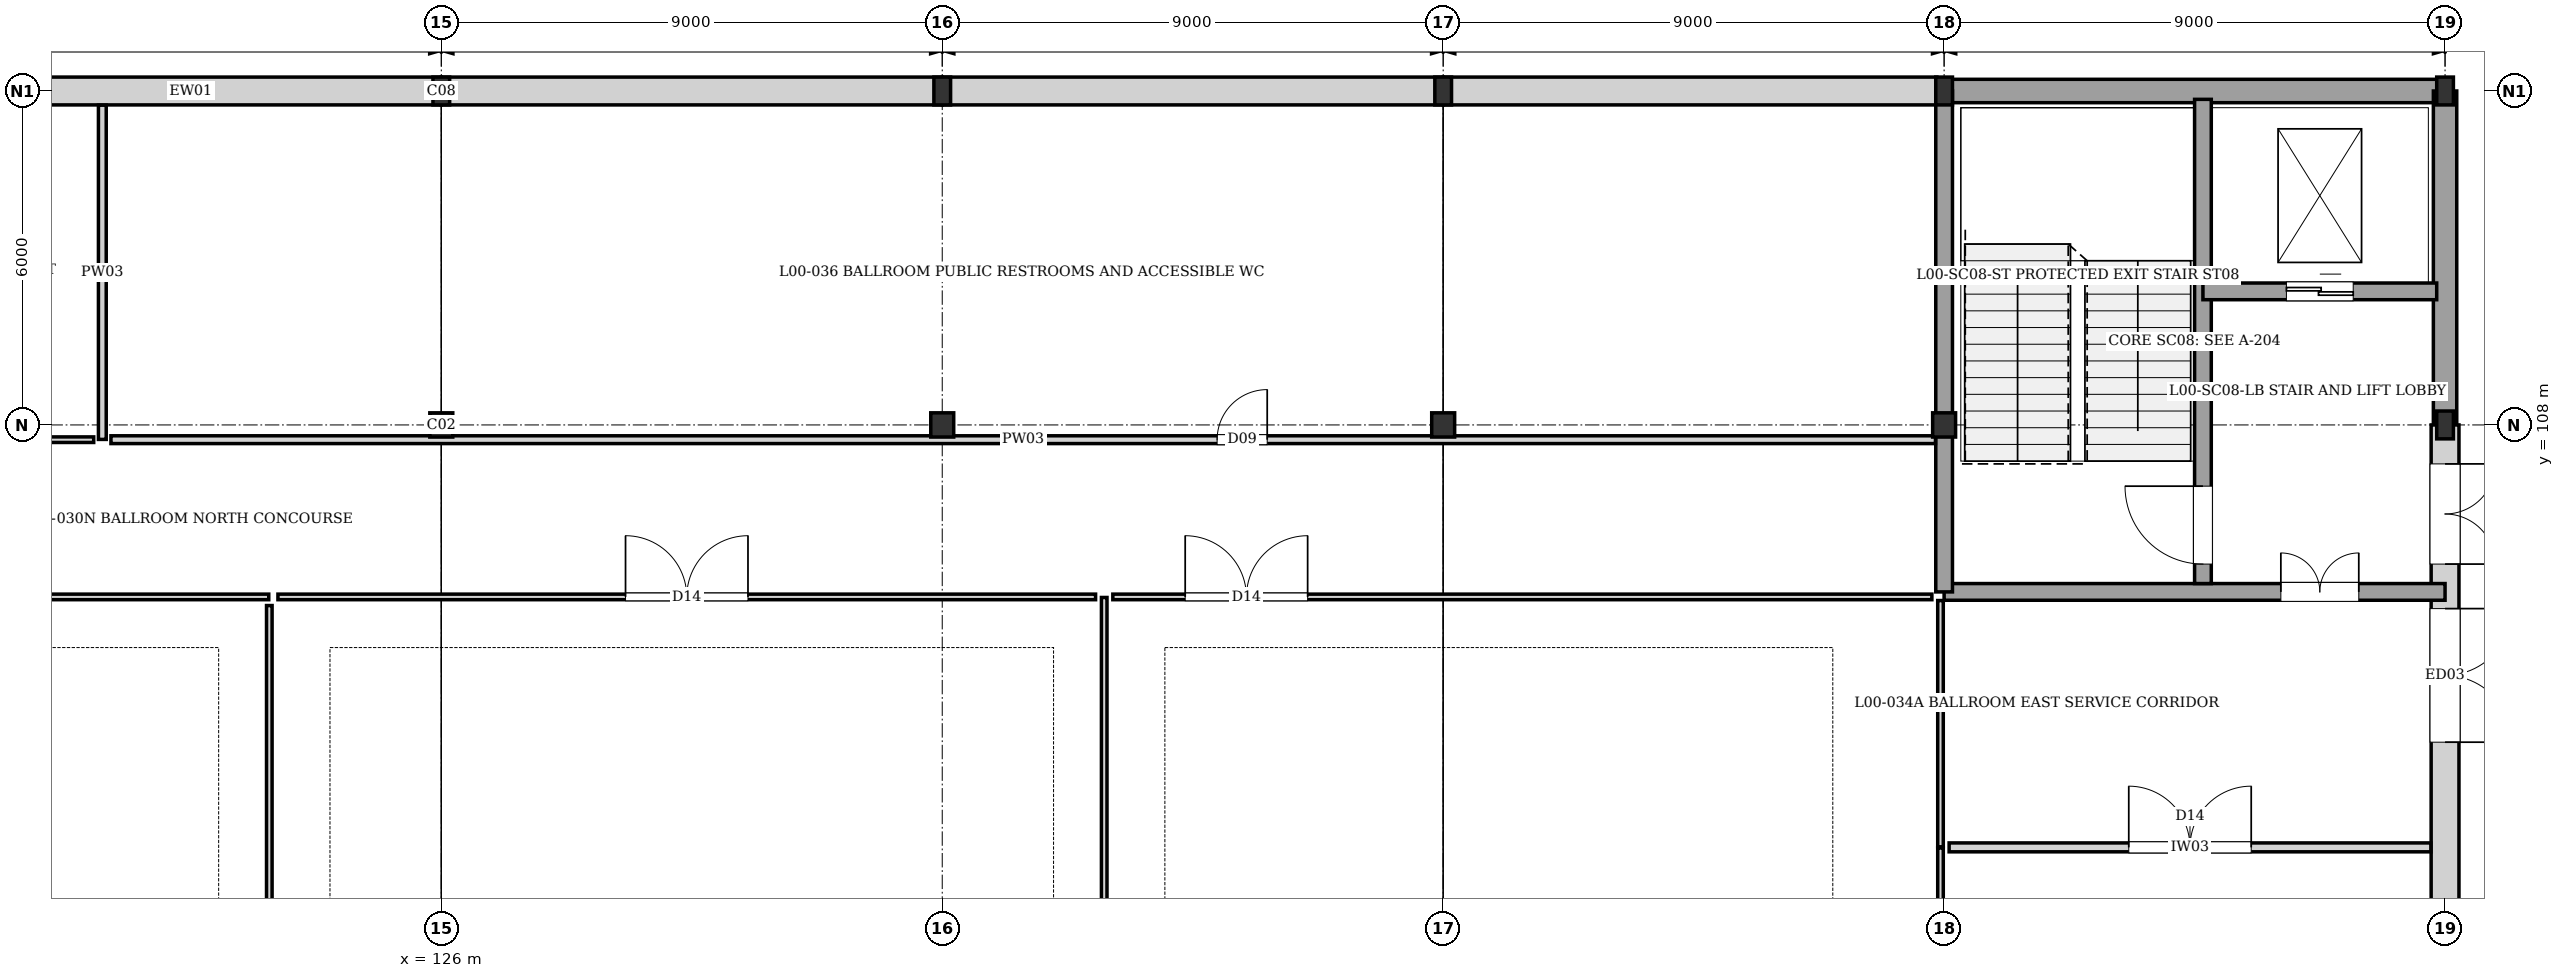
"""IFC4 building model, lengths in metres.
Left out: names, types, materials, properties, quantities, classifications, styles, units other than length and angle.
Written with IfcOpenShell. Run it as: python <this file> out.ifc"""

import sys

from ifc_helpers import new_model, si_unit, direction, frame, frame_2d, origin, origin_2d, place, context, subcontext, project, spatial, rectangle, i_section, extrude, element, fill, save


model = new_model("IFC4")
c1 = context("Model", 3, precision=1e-05, world=origin(), true_north=direction((0.0, 1.0)))
c2 = subcontext(c1, "Body", "Model", "MODEL_VIEW")
j1 = project(units=[si_unit("LENGTHUNIT", "METRE"), si_unit("PLANEANGLEUNIT", "RADIAN")], contexts=[c1])
p1 = place(None, origin())
s1 = spatial("IfcSite", under=j1, at=p1, CompositionType="ELEMENT")
p2 = place(p1, origin())
s2 = spatial("IfcBuilding", under=s1, at=p2, CompositionType="ELEMENT")
p3 = place(p2, origin())
s3 = spatial("IfcBuildingStorey", under=s2, at=p3, CompositionType="ELEMENT", Elevation=0.0)
p4 = place(p3, frame((126.0, 108.0, 0.0), z_axis=(0.0, 0.0, 1.0), x_axis=(1.0, 0.0, 0.0)))
e1 = element("IfcColumn", 1, at=p4, inside=s3, PredefinedType="COLUMN", context=c2, shape_type="SweptSolid", body=[
    extrude(i_section(OverallWidth=0.412, OverallDepth=0.435, WebThickness=0.027, FlangeThickness=0.046, at=origin_2d()), origin(), (0.0, 0.0, 1.0), 4.32),
])
p5 = place(p3, frame((126.0, 114.0, 0.0), z_axis=(0.0, 0.0, 1.0), x_axis=(1.0, 0.0, 0.0)))
e2 = element("IfcColumn", 2, at=p5, inside=s3, PredefinedType="COLUMN", context=c2, shape_type="SweptSolid", body=[
    extrude(i_section(OverallWidth=0.3, OverallDepth=0.5, WebThickness=0.014, FlangeThickness=0.028, at=origin_2d()), origin(), (0.0, 0.0, 1.0), 4.32),
])
p6 = place(p3, frame((135.0, 108.0, 0.0), z_axis=(0.0, 0.0, 1.0), x_axis=(1.0, 0.0, 0.0)))
e3 = element("IfcColumn", 3, at=p6, inside=s3, PredefinedType="COLUMN", context=c2, shape_type="SweptSolid", body=[
    extrude(i_section(OverallWidth=0.412, OverallDepth=0.435, WebThickness=0.027, FlangeThickness=0.046, at=origin_2d()), origin(), (0.0, 0.0, 1.0), 4.32),
])
p7 = place(p3, frame((135.0, 114.0, 0.0), z_axis=(0.0, 0.0, 1.0), x_axis=(1.0, 0.0, 0.0)))
e4 = element("IfcColumn", 4, at=p7, inside=s3, PredefinedType="COLUMN", context=c2, shape_type="SweptSolid", body=[
    extrude(i_section(OverallWidth=0.3, OverallDepth=0.5, WebThickness=0.014, FlangeThickness=0.028, at=origin_2d()), origin(), (0.0, 0.0, 1.0), 4.32),
])
p8 = place(p3, frame((144.0, 108.0, 0.0), z_axis=(0.0, 0.0, 1.0), x_axis=(1.0, 0.0, 0.0)))
e5 = element("IfcColumn", 5, at=p8, inside=s3, PredefinedType="COLUMN", context=c2, shape_type="SweptSolid", body=[
    extrude(i_section(OverallWidth=0.412, OverallDepth=0.435, WebThickness=0.027, FlangeThickness=0.046, at=origin_2d()), origin(), (0.0, 0.0, 1.0), 4.32),
])
p9 = place(p3, frame((144.0, 114.0, 0.0), z_axis=(0.0, 0.0, 1.0), x_axis=(1.0, 0.0, 0.0)))
e6 = element("IfcColumn", 6, at=p9, inside=s3, PredefinedType="COLUMN", context=c2, shape_type="SweptSolid", body=[
    extrude(i_section(OverallWidth=0.3, OverallDepth=0.5, WebThickness=0.014, FlangeThickness=0.028, at=origin_2d()), origin(), (0.0, 0.0, 1.0), 4.32),
])
p10 = place(p3, frame((153.0, 108.0, 0.0), z_axis=(0.0, 0.0, 1.0), x_axis=(1.0, 0.0, 0.0)))
e7 = element("IfcColumn", 7, at=p10, inside=s3, PredefinedType="COLUMN", context=c2, shape_type="SweptSolid", body=[
    extrude(i_section(OverallWidth=0.412, OverallDepth=0.435, WebThickness=0.027, FlangeThickness=0.046, at=origin_2d()), origin(), (0.0, 0.0, 1.0), 4.32),
])
for number, where, z_axis, x_axis in (
    (8, (153.0, 114.0, 0.0), (0.0, 0.0, 1.0), (1.0, 0.0, 0.0)),
    (9, (162.0, 108.0, 0.0), (0.0, 0.0, 1.0), (1.0, 0.0, 0.0)),
    (10, (162.0, 114.0, 0.0), (0.0, 0.0, 1.0), (1.0, 0.0, 0.0)),
):
    element("IfcColumn", number, at=place(p3, frame(where, z_axis=z_axis, x_axis=x_axis)), inside=s3, PredefinedType="COLUMN", context=c2, shape_type="SweptSolid", body=[
        extrude(i_section(OverallWidth=0.3, OverallDepth=0.5, WebThickness=0.014, FlangeThickness=0.028, at=origin_2d()), origin(), (0.0, 0.0, 1.0), 4.32),
    ])
p11 = place(p3, frame((117.0, 114.0, 0.0), z_axis=(0.0, 0.0, 1.0), x_axis=(1.0, 0.0, 0.0)))
e11 = element("IfcWall", 11, at=p11, inside=s3, PredefinedType="SOLIDWALL", context=c2, shape_type="SweptSolid", body=[
    extrude(rectangle(XDim=9.0, YDim=0.5, at=frame_2d((4.5, 0.0))), origin(), (0.0, 0.0, 1.0), 3.655),
])
p12 = place(p3, frame((126.0, 114.0, 0.0), z_axis=(0.0, 0.0, 1.0), x_axis=(1.0, 0.0, 0.0)))
e12 = element("IfcWall", 12, at=p12, inside=s3, PredefinedType="SOLIDWALL", context=c2, shape_type="SweptSolid", body=[
    extrude(rectangle(XDim=9.0, YDim=0.5, at=frame_2d((4.5, 0.0))), origin(), (0.0, 0.0, 1.0), 3.825),
])
p13 = place(p3, frame((135.0, 114.0, 0.0), z_axis=(0.0, 0.0, 1.0), x_axis=(1.0, 0.0, 0.0)))
e13 = element("IfcWall", 13, at=p13, inside=s3, PredefinedType="SOLIDWALL", context=c2, shape_type="SweptSolid", body=[
    extrude(rectangle(XDim=9.0, YDim=0.5, at=frame_2d((4.5, 0.0))), origin(), (0.0, 0.0, 1.0), 3.755),
])
p14 = place(p3, frame((144.0, 114.0, 0.0), z_axis=(0.0, 0.0, 1.0), x_axis=(1.0, 0.0, 0.0)))
e14 = element("IfcWall", 14, at=p14, inside=s3, PredefinedType="SOLIDWALL", context=c2, shape_type="SweptSolid", body=[
    extrude(rectangle(XDim=8.87, YDim=0.5, at=frame_2d((4.435, 0.0))), origin(), (0.0, 0.0, 1.0), 3.695),
])
p15 = place(p3, frame((153.0, 114.0, 0.0), z_axis=(0.0, 0.0, 1.0), x_axis=(1.0, 0.0, 0.0)))
e15 = element("IfcWall", 15, at=p15, inside=s3, PredefinedType="SOLIDWALL", context=c2, shape_type="SweptSolid", body=[
    extrude(rectangle(XDim=9.0, YDim=0.42, at=frame_2d((4.5, 0.0))), origin(), (0.0, 0.0, 1.0), 4.055),
])
p16 = place(p3, frame((162.0, 114.0, 0.0), z_axis=(0.0, 0.0, 1.0), x_axis=(0.0, -1.0, 0.0)))
e16 = element("IfcWall", 16, at=p16, inside=s3, PredefinedType="SOLIDWALL", context=c2, shape_type="SweptSolid", body=[
    extrude(rectangle(XDim=6.0, YDim=0.42, at=frame_2d((3.0, 0.0))), origin(), (0.0, 0.0, 1.0), 4.055),
])
p17 = place(p3, frame((162.0, 108.0, 0.0), z_axis=(0.0, 0.0, 1.0), x_axis=(0.0, -1.0, 0.0)))
e17 = element("IfcWall", 17, at=p17, inside=s3, PredefinedType="SOLIDWALL", context=c2, shape_type="SweptSolid", body=[
    extrude(rectangle(XDim=9.0, YDim=0.5, at=frame_2d((4.5, 0.0))), origin(), (0.0, 0.0, 1.0), 3.695),
])
p18 = place(p17, frame((0.7, 0.0, 0.0)))
e18 = element("IfcOpeningElement", 18, at=p18, cuts=e17, PredefinedType="OPENING", context=c2, shape_type="SweptSolid", body=[
    extrude(rectangle(XDim=1.8, YDim=2.2, at=frame_2d((0.9, 1.1))), frame((0.0, 0.26, 0.0), z_axis=(0.0, -1.0, 0.0), x_axis=(1.0, 0.0, 0.0)), (0.0, 0.0, 1.0), 0.52),
])
p19 = place(p17, frame((3.3, 0.0, 0.0)))
e19 = element("IfcOpeningElement", 19, at=p19, cuts=e17, PredefinedType="OPENING", context=c2, shape_type="SweptSolid", body=[
    extrude(rectangle(XDim=2.4, YDim=2.5, at=frame_2d((1.2, 1.25))), frame((0.0, 0.26, 0.0), z_axis=(0.0, -1.0, 0.0), x_axis=(1.0, 0.0, 0.0)), (0.0, 0.0, 1.0), 0.52),
])
p20 = place(p3, frame((153.0, 105.0, 0.0), z_axis=(0.0, 0.0, 1.0), x_axis=(1.0, 0.0, 0.0)))
e20 = element("IfcWall", 20, at=p20, inside=s3, PredefinedType="SHEAR", context=c2, shape_type="SweptSolid", body=[
    extrude(rectangle(XDim=9.0, YDim=0.3, at=frame_2d((4.5, 0.0))), origin(), (0.0, 0.0, 1.0), 4.055),
])
p21 = place(p20, frame((6.05, 0.0, 0.0)))
e21 = element("IfcOpeningElement", 21, at=p21, cuts=e20, PredefinedType="OPENING", context=c2, shape_type="SweptSolid", body=[
    extrude(rectangle(XDim=1.4, YDim=2.02, at=frame_2d((0.7, 1.01))), frame((0.0, 0.16, 0.0), z_axis=(0.0, -1.0, 0.0), x_axis=(1.0, 0.0, 0.0)), (0.0, 0.0, 1.0), 0.32),
])
p22 = place(p3, frame((153.0, 105.0, 0.0), z_axis=(0.0, 0.0, 1.0), x_axis=(0.0, 1.0, 0.0)))
e22 = element("IfcWall", 22, at=p22, inside=s3, PredefinedType="SHEAR", context=c2, shape_type="SweptSolid", body=[
    extrude(rectangle(XDim=9.0, YDim=0.3, at=frame_2d((4.5, 0.0))), origin(), (0.0, 0.0, 1.0), 4.055),
])
p23 = place(p3, frame((157.65, 105.15, 0.0), z_axis=(0.0, 0.0, 1.0), x_axis=(0.0, 1.0, 0.0)))
e23 = element("IfcWall", 23, at=p23, inside=s3, PredefinedType="SHEAR", context=c2, shape_type="SweptSolid", body=[
    extrude(rectangle(XDim=8.7, YDim=0.3, at=frame_2d((4.35, 0.0))), origin(), (0.0, 0.0, 1.0), 4.055),
])
p24 = place(p23, frame((0.35, 0.0, 0.0)))
e24 = element("IfcOpeningElement", 24, at=p24, cuts=e23, PredefinedType="OPENING", context=c2, shape_type="SweptSolid", body=[
    extrude(rectangle(XDim=1.4, YDim=2.02, at=frame_2d((0.7, 1.01))), frame((0.0, 0.16, 0.0), z_axis=(0.0, -1.0, 0.0), x_axis=(1.0, 0.0, 0.0)), (0.0, 0.0, 1.0), 0.32),
])
p25 = place(p3, frame((157.65, 110.4, 0.0), z_axis=(0.0, 0.0, 1.0), x_axis=(1.0, 0.0, 0.0)))
e25 = element("IfcWall", 25, at=p25, inside=s3, PredefinedType="SHEAR", context=c2, shape_type="SweptSolid", body=[
    extrude(rectangle(XDim=4.2, YDim=0.3, at=frame_2d((2.1, 0.0))), origin(), (0.0, 0.0, 1.0), 4.055),
])
p26 = place(p25, frame((1.5, 0.0, 0.0)))
e26 = element("IfcOpeningElement", 26, at=p26, cuts=e25, PredefinedType="OPENING", context=c2, shape_type="SweptSolid", body=[
    extrude(rectangle(XDim=1.2, YDim=2.2, at=frame_2d((0.6, 1.1))), frame((0.0, 0.16, 0.0), z_axis=(0.0, -1.0, 0.0), x_axis=(1.0, 0.0, 0.0)), (0.0, 0.0, 1.0), 0.32),
])
p27 = place(p3, frame((108.155, 104.91, 0.0), z_axis=(0.0, 0.0, 1.0), x_axis=(1.0, 0.0, 0.0)))
e27 = element("IfcWall", 27, at=p27, inside=s3, PredefinedType="PARTITIONING", context=c2, shape_type="SweptSolid", body=[
    extrude(rectangle(XDim=14.745, YDim=0.1, at=frame_2d((7.373, 0.0))), origin(), (0.0, 0.0, 1.0), 4.055),
])
p28 = place(p3, frame((122.91, 72.255, 0.0), z_axis=(0.0, 0.0, 1.0), x_axis=(0.0, 1.0, 0.0)))
e28 = element("IfcWall", 28, at=p28, inside=s3, PredefinedType="PARTITIONING", context=c2, shape_type="SweptSolid", body=[
    extrude(rectangle(XDim=32.5, YDim=0.1, at=frame_2d((16.25, 0.0))), origin(), (0.0, 0.0, 1.0), 4.055),
])
p29 = place(p3, frame((137.91, 72.255, 0.0), z_axis=(0.0, 0.0, 1.0), x_axis=(0.0, 1.0, 0.0)))
e29 = element("IfcWall", 29, at=p29, inside=s3, PredefinedType="PARTITIONING", context=c2, shape_type="SweptSolid", body=[
    extrude(rectangle(XDim=32.645, YDim=0.1, at=frame_2d((16.323, 0.0))), origin(), (0.0, 0.0, 1.0), 4.055),
])
p30 = place(p3, frame((152.935, 100.42, 0.0), z_axis=(0.0, 0.0, 1.0), x_axis=(0.0, 1.0, 0.0)))
e30 = element("IfcWall", 30, at=p30, inside=s3, PredefinedType="PARTITIONING", context=c2, shape_type="SweptSolid", body=[
    extrude(rectangle(XDim=4.425, YDim=0.1, at=frame_2d((2.212, 0.0))), origin(), (0.0, 0.0, 1.0), 3.665),
])
p31 = place(p3, frame((119.91, 107.74, 0.0), z_axis=(0.0, 0.0, 1.0), x_axis=(0.0, 1.0, 0.0)))
e31 = element("IfcWall", 31, at=p31, inside=s3, PredefinedType="PLUMBINGWALL", context=c2, shape_type="SweptSolid", body=[
    extrude(rectangle(XDim=6.005, YDim=0.14, at=frame_2d((3.002, 0.0))), origin(), (0.0, 0.0, 1.0), 4.055),
])
p32 = place(p3, frame((123.065, 104.91, 0.0), z_axis=(0.0, 0.0, 1.0), x_axis=(1.0, 0.0, 0.0)))
e32 = element("IfcWall", 32, at=p32, inside=s3, PredefinedType="PARTITIONING", context=c2, shape_type="SweptSolid", body=[
    extrude(rectangle(XDim=14.69, YDim=0.1, at=frame_2d((7.345, 0.0))), origin(), (0.0, 0.0, 1.0), 4.055),
])
p33 = place(p32, frame((6.245, 0.0, 0.0)))
e33 = element("IfcOpeningElement", 33, at=p33, cuts=e32, PredefinedType="OPENING", context=c2, shape_type="SweptSolid", body=[
    extrude(rectangle(XDim=2.2, YDim=2.45, at=frame_2d((1.1, 1.225))), frame((0.0, 0.06, 0.0), z_axis=(0.0, -1.0, 0.0), x_axis=(1.0, 0.0, 0.0)), (0.0, 0.0, 1.0), 0.12),
])
p34 = place(p3, frame((138.065, 104.91, 0.0), z_axis=(0.0, 0.0, 1.0), x_axis=(1.0, 0.0, 0.0)))
e34 = element("IfcWall", 34, at=p34, inside=s3, PredefinedType="PARTITIONING", context=c2, shape_type="SweptSolid", body=[
    extrude(rectangle(XDim=14.715, YDim=0.1, at=frame_2d((7.357, 0.0))), origin(), (0.0, 0.0, 1.0), 4.055),
])
p35 = place(p34, frame((1.3, 0.0, 0.0)))
e35 = element("IfcOpeningElement", 35, at=p35, cuts=e34, PredefinedType="OPENING", context=c2, shape_type="SweptSolid", body=[
    extrude(rectangle(XDim=2.2, YDim=2.45, at=frame_2d((1.1, 1.225))), frame((0.0, 0.06, 0.0), z_axis=(0.0, -1.0, 0.0), x_axis=(1.0, 0.0, 0.0)), (0.0, 0.0, 1.0), 0.12),
])
p36 = place(p3, frame((108.155, 107.735, 0.0), z_axis=(0.0, 0.0, 1.0), x_axis=(1.0, 0.0, 0.0)))
e36 = element("IfcWall", 36, at=p36, inside=s3, PredefinedType="PARTITIONING", context=c2, shape_type="SweptSolid", body=[
    extrude(rectangle(XDim=11.6, YDim=0.1, at=frame_2d((5.8, 0.0))), origin(), (0.0, 0.0, 1.0), 4.055),
])
p37 = place(p36, frame((3.308, 0.0, 0.0)))
e37 = element("IfcOpeningElement", 37, at=p37, cuts=e36, PredefinedType="OPENING", context=c2, shape_type="SweptSolid", body=[
    extrude(rectangle(XDim=2.2, YDim=2.45, at=frame_2d((1.1, 1.225))), frame((0.0, 0.06, 0.0), z_axis=(0.0, -1.0, 0.0), x_axis=(1.0, 0.0, 0.0)), (0.0, 0.0, 1.0), 0.12),
])
p38 = place(p3, frame((120.065, 107.735, 0.0), z_axis=(0.0, 0.0, 1.0), x_axis=(1.0, 0.0, 0.0)))
e38 = element("IfcWall", 38, at=p38, inside=s3, PredefinedType="PLUMBINGWALL", context=c2, shape_type="SweptSolid", body=[
    extrude(rectangle(XDim=32.78, YDim=0.14, at=frame_2d((16.39, 0.0))), origin(), (0.0, 0.0, 1.0), 4.055),
])
p39 = place(p38, frame((19.874, 0.0, 0.0)))
e39 = element("IfcOpeningElement", 39, at=p39, cuts=e38, PredefinedType="OPENING", context=c2, shape_type="SweptSolid", body=[
    extrude(rectangle(XDim=0.9, YDim=2.1, at=frame_2d((0.45, 1.05))), frame((0.0, 0.08, 0.0), z_axis=(0.0, -1.0, 0.0), x_axis=(1.0, 0.0, 0.0)), (0.0, 0.0, 1.0), 0.16),
])
p40 = place(p3, frame((153.09, 100.41, 0.0), z_axis=(0.0, 0.0, 1.0), x_axis=(1.0, 0.0, 0.0)))
e40 = element("IfcWall", 40, at=p40, inside=s3, PredefinedType="PARTITIONING", context=c2, shape_type="SweptSolid", body=[
    extrude(rectangle(XDim=8.655, YDim=0.16, at=frame_2d((4.328, 0.0))), origin(), (0.0, 0.0, 1.0), 4.055),
])
p41 = place(p40, frame((3.228, 0.0, 0.0)))
e41 = element("IfcOpeningElement", 41, at=p41, cuts=e40, PredefinedType="OPENING", context=c2, shape_type="SweptSolid", body=[
    extrude(rectangle(XDim=2.2, YDim=2.45, at=frame_2d((1.1, 1.225))), frame((0.0, 0.09, 0.0), z_axis=(0.0, -1.0, 0.0), x_axis=(1.0, 0.0, 0.0)), (0.0, 0.0, 1.0), 0.18),
])
p42 = place(p3, frame((152.935, 98.98, 0.0), z_axis=(0.0, 0.0, 1.0), x_axis=(0.0, 1.0, 0.0)))
e42 = element("IfcWall", 42, at=p42, inside=s3, PredefinedType="PARTITIONING", context=c2, shape_type="SweptSolid", body=[
    extrude(rectangle(XDim=1.42, YDim=0.1, at=frame_2d((0.71, 0.0))), origin(), (0.0, 0.0, 1.0), 3.665),
])
p43 = place(p18, origin())
e43 = element("IfcDoor", 43, at=p43, inside=s3, OperationType="DOUBLE_DOOR_SINGLE_SWING", PredefinedType="DOOR", context=c2, shape_type="SweptSolid", body=[
    extrude(rectangle(XDim=1.8, YDim=2.2, at=frame_2d((0.9, 1.1))), frame((0.0, 0.025, 0.0), z_axis=(0.0, -1.0, 0.0), x_axis=(1.0, 0.0, 0.0)), (0.0, 0.0, 1.0), 0.05),
])
fill(e18, e43)
p44 = place(p19, origin())
e44 = element("IfcDoor", 44, at=p44, inside=s3, OperationType="DOUBLE_DOOR_SINGLE_SWING", PredefinedType="DOOR", context=c2, shape_type="SweptSolid", body=[
    extrude(rectangle(XDim=2.4, YDim=2.5, at=frame_2d((1.2, 1.25))), frame((0.0, 0.025, 0.0), z_axis=(0.0, -1.0, 0.0), x_axis=(1.0, 0.0, 0.0)), (0.0, 0.0, 1.0), 0.05),
])
fill(e19, e44)
p45 = place(p21, origin())
e45 = element("IfcDoor", 45, at=p45, inside=s3, OperationType="DOUBLE_DOOR_SINGLE_SWING", PredefinedType="DOOR", context=c2, shape_type="SweptSolid", body=[
    extrude(rectangle(XDim=1.4, YDim=2.02, at=frame_2d((0.7, 1.01))), frame((0.0, 0.025, 0.0), z_axis=(0.0, -1.0, 0.0), x_axis=(1.0, 0.0, 0.0)), (0.0, 0.0, 1.0), 0.05),
])
fill(e21, e45)
p46 = place(p24, origin())
e46 = element("IfcDoor", 46, at=p46, inside=s3, OperationType="SINGLE_SWING_RIGHT", PredefinedType="DOOR", context=c2, shape_type="SweptSolid", body=[
    extrude(rectangle(XDim=1.4, YDim=2.02, at=frame_2d((0.7, 1.01))), frame((0.0, 0.025, 0.0), z_axis=(0.0, -1.0, 0.0), x_axis=(1.0, 0.0, 0.0)), (0.0, 0.0, 1.0), 0.05),
])
fill(e24, e46)
p47 = place(p26, origin())
e47 = element("IfcDoor", 47, at=p47, inside=s3, OperationType="DOUBLE_DOOR_SLIDING", PredefinedType="DOOR", context=c2, shape_type="SweptSolid", body=[
    extrude(rectangle(XDim=1.2, YDim=2.2, at=frame_2d((0.6, 1.1))), frame((0.0, 0.025, 0.0), z_axis=(0.0, -1.0, 0.0), x_axis=(1.0, 0.0, 0.0)), (0.0, 0.0, 1.0), 0.05),
])
fill(e26, e47)
p48 = place(p33, origin())
e48 = element("IfcDoor", 48, at=p48, inside=s3, OperationType="DOUBLE_DOOR_SINGLE_SWING", PredefinedType="DOOR", context=c2, shape_type="SweptSolid", body=[
    extrude(rectangle(XDim=2.2, YDim=2.45, at=frame_2d((1.1, 1.225))), frame((0.0, 0.025, 0.0), z_axis=(0.0, -1.0, 0.0), x_axis=(1.0, 0.0, 0.0)), (0.0, 0.0, 1.0), 0.05),
])
fill(e33, e48)
p49 = place(p35, origin())
e49 = element("IfcDoor", 49, at=p49, inside=s3, OperationType="DOUBLE_DOOR_SINGLE_SWING", PredefinedType="DOOR", context=c2, shape_type="SweptSolid", body=[
    extrude(rectangle(XDim=2.2, YDim=2.45, at=frame_2d((1.1, 1.225))), frame((0.0, 0.025, 0.0), z_axis=(0.0, -1.0, 0.0), x_axis=(1.0, 0.0, 0.0)), (0.0, 0.0, 1.0), 0.05),
])
fill(e35, e49)
p50 = place(p39, origin())
e50 = element("IfcDoor", 50, at=p50, inside=s3, OperationType="SINGLE_SWING_RIGHT", PredefinedType="DOOR", context=c2, shape_type="SweptSolid", body=[
    extrude(rectangle(XDim=0.9, YDim=2.1, at=frame_2d((0.45, 1.05))), frame((0.0, 0.025, 0.0), z_axis=(0.0, -1.0, 0.0), x_axis=(1.0, 0.0, 0.0)), (0.0, 0.0, 1.0), 0.05),
])
fill(e39, e50)
p51 = place(p41, origin())
e51 = element("IfcDoor", 51, at=p51, inside=s3, OperationType="DOUBLE_DOOR_SINGLE_SWING", PredefinedType="DOOR", context=c2, shape_type="SweptSolid", body=[
    extrude(rectangle(XDim=2.2, YDim=2.45, at=frame_2d((1.1, 1.225))), frame((0.0, 0.025, 0.0), z_axis=(0.0, -1.0, 0.0), x_axis=(1.0, 0.0, 0.0)), (0.0, 0.0, 1.0), 0.05),
])
fill(e41, e51)
save(model, sys.argv[1])
